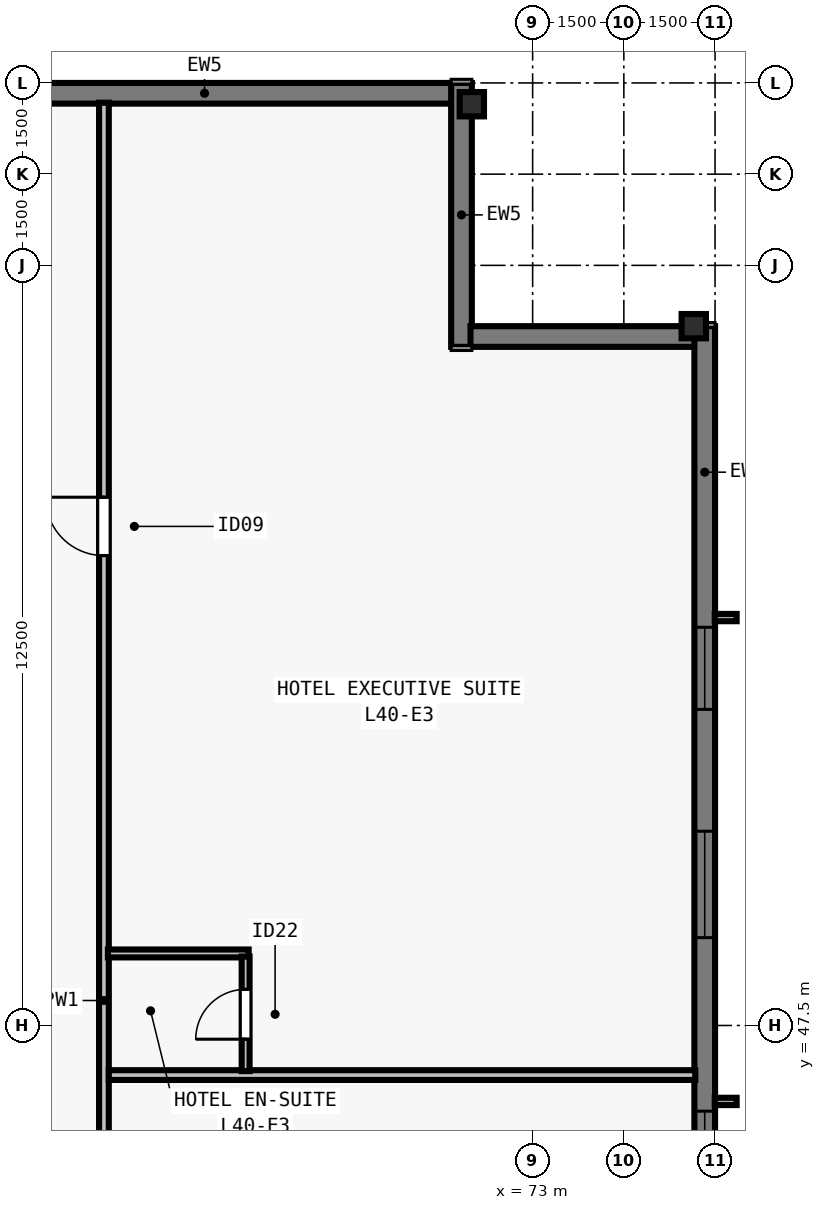
"""IFC4 building model, lengths in metres.
Left out: names, types, materials, properties, quantities, classifications, styles, units other than length and angle.
Written with IfcOpenShell. Run it as: python <this file> out.ifc"""

import sys

from ifc_helpers import new_model, si_unit, direction, frame, frame_2d, origin, origin_2d, place, context, subcontext, project, spatial, rectangle, i_section, extrude, element, fill, save


model = new_model("IFC4")
c1 = context("Model", 3, precision=1e-05, world=origin(), true_north=direction((0.0, 1.0)))
c2 = subcontext(c1, "Body", "Model", "MODEL_VIEW")
j1 = project(units=[si_unit("LENGTHUNIT", "METRE"), si_unit("PLANEANGLEUNIT", "RADIAN")], contexts=[c1])
p1 = place(None, origin())
s1 = spatial("IfcSite", under=j1, at=p1, CompositionType="ELEMENT")
p2 = place(p1, origin())
s2 = spatial("IfcBuilding", under=s1, at=p2, CompositionType="ELEMENT")
p3 = place(p2, frame((0.0, 0.0, 148.0)))
s3 = spatial("IfcBuildingStorey", under=s2, at=p3, CompositionType="ELEMENT", Elevation=148.0)
for number, where, z_axis, x_axis in (
    (1, (75.65, 59.0, 0.0), (0.0, 0.0, 1.0), (0.0, 1.0, 0.0)),
    (2, (72.0, 62.65, 0.0), (0.0, 0.0, 1.0), (1.0, 0.0, 0.0)),
):
    element("IfcColumn", number, at=place(p3, frame(where, z_axis=z_axis, x_axis=x_axis)), inside=s3, PredefinedType="COLUMN", context=c2, shape_type="SweptSolid", body=[
        extrude(i_section(OverallWidth=0.4, OverallDepth=0.4, WebThickness=0.022, FlangeThickness=0.036, at=origin_2d()), origin(), (0.0, 0.0, 1.0), 3.5),
    ])
p4 = place(p3, frame((32.0, 62.83, 0.0), z_axis=(0.0, 0.0, 1.0), x_axis=(1.0, 0.0, 0.0)))
e3 = element("IfcWall", 3, at=p4, inside=s3, PredefinedType="SOLIDWALL", context=c2, shape_type="SweptSolid", body=[
    extrude(rectangle(XDim=39.682, YDim=0.34, at=frame_2d((19.841, 0.0))), origin(), (0.0, 0.0, 1.0), 3.28),
])
p5 = place(p4, frame((4.952, 0.0, 0.8)))
e4 = element("IfcOpeningElement", 4, at=p5, cuts=e3, PredefinedType="OPENING", context=c2, shape_type="SweptSolid", body=[
    extrude(rectangle(XDim=1.35, YDim=1.66, at=frame_2d((0.675, 0.83))), frame((0.0, 0.18, 0.0), z_axis=(0.0, -1.0, 0.0), x_axis=(1.0, 0.0, 0.0)), (0.0, 0.0, 1.0), 0.36),
])
p6 = place(p4, frame((12.059, 0.0, 0.8)))
e5 = element("IfcOpeningElement", 5, at=p6, cuts=e3, PredefinedType="OPENING", context=c2, shape_type="SweptSolid", body=[
    extrude(rectangle(XDim=1.35, YDim=1.66, at=frame_2d((0.675, 0.83))), frame((0.0, 0.18, 0.0), z_axis=(0.0, -1.0, 0.0), x_axis=(1.0, 0.0, 0.0)), (0.0, 0.0, 1.0), 0.36),
])
p7 = place(p4, frame((16.262, 0.0, 0.8)))
e6 = element("IfcOpeningElement", 6, at=p7, cuts=e3, PredefinedType="OPENING", context=c2, shape_type="SweptSolid", body=[
    extrude(rectangle(XDim=1.75, YDim=1.66, at=frame_2d((0.875, 0.83))), frame((0.0, 0.18, 0.0), z_axis=(0.0, -1.0, 0.0), x_axis=(1.0, 0.0, 0.0)), (0.0, 0.0, 1.0), 0.36),
])
p8 = place(p4, frame((18.316, 0.0, 0.8)))
e7 = element("IfcOpeningElement", 7, at=p8, cuts=e3, PredefinedType="OPENING", context=c2, shape_type="SweptSolid", body=[
    extrude(rectangle(XDim=1.35, YDim=1.66, at=frame_2d((0.675, 0.83))), frame((0.0, 0.18, 0.0), z_axis=(0.0, -1.0, 0.0), x_axis=(1.0, 0.0, 0.0)), (0.0, 0.0, 1.0), 0.36),
])
p9 = place(p4, frame((22.07, 0.0, 0.8)))
e8 = element("IfcOpeningElement", 8, at=p9, cuts=e3, PredefinedType="OPENING", context=c2, shape_type="SweptSolid", body=[
    extrude(rectangle(XDim=1.75, YDim=1.66, at=frame_2d((0.875, 0.83))), frame((0.0, 0.18, 0.0), z_axis=(0.0, -1.0, 0.0), x_axis=(1.0, 0.0, 0.0)), (0.0, 0.0, 1.0), 0.36),
])
p10 = place(p4, frame((26.273, 0.0, 0.8)))
e9 = element("IfcOpeningElement", 9, at=p10, cuts=e3, PredefinedType="OPENING", context=c2, shape_type="SweptSolid", body=[
    extrude(rectangle(XDim=1.35, YDim=1.66, at=frame_2d((0.675, 0.83))), frame((0.0, 0.18, 0.0), z_axis=(0.0, -1.0, 0.0), x_axis=(1.0, 0.0, 0.0)), (0.0, 0.0, 1.0), 0.36),
])
p11 = place(p4, frame((29.627, 0.0, 0.8)))
e10 = element("IfcOpeningElement", 10, at=p11, cuts=e3, PredefinedType="OPENING", context=c2, shape_type="SweptSolid", body=[
    extrude(rectangle(XDim=1.75, YDim=1.66, at=frame_2d((0.875, 0.83))), frame((0.0, 0.18, 0.0), z_axis=(0.0, -1.0, 0.0), x_axis=(1.0, 0.0, 0.0)), (0.0, 0.0, 1.0), 0.36),
])
p12 = place(p3, frame((71.83, 63.0, 0.0), z_axis=(0.0, 0.0, 1.0), x_axis=(0.0, -1.0, 0.0)))
e11 = element("IfcWall", 11, at=p12, inside=s3, PredefinedType="SOLIDWALL", context=c2, shape_type="SweptSolid", body=[
    extrude(rectangle(XDim=4.34, YDim=0.34, at=frame_2d((2.17, 0.0))), origin(), (0.0, 0.0, 1.0), 3.28),
])
p13 = place(p3, frame((71.978, 58.83, 0.0), z_axis=(0.0, 0.0, 1.0), x_axis=(1.0, 0.0, 0.0)))
e12 = element("IfcWall", 12, at=p13, inside=s3, PredefinedType="SOLIDWALL", context=c2, shape_type="SweptSolid", body=[
    extrude(rectangle(XDim=3.704, YDim=0.34, at=frame_2d((1.852, 0.0))), origin(), (0.0, 0.0, 1.0), 3.28),
])
p14 = place(p3, frame((75.83, 59.0, 0.0), z_axis=(0.0, 0.0, 1.0), x_axis=(0.0, -1.0, 0.0)))
e13 = element("IfcWall", 13, at=p14, inside=s3, PredefinedType="SOLIDWALL", context=c2, shape_type="SweptSolid", body=[
    extrude(rectangle(XDim=39.682, YDim=0.34, at=frame_2d((19.841, 0.0))), origin(), (0.0, 0.0, 1.0), 3.28),
])
p15 = place(p14, frame((4.952, 0.0, 0.8)))
e14 = element("IfcOpeningElement", 14, at=p15, cuts=e13, PredefinedType="OPENING", context=c2, shape_type="SweptSolid", body=[
    extrude(rectangle(XDim=1.35, YDim=1.66, at=frame_2d((0.675, 0.83))), frame((0.0, 0.18, 0.0), z_axis=(0.0, -1.0, 0.0), x_axis=(1.0, 0.0, 0.0)), (0.0, 0.0, 1.0), 0.36),
])
p16 = place(p14, frame((8.305, 0.0, 0.8)))
e15 = element("IfcOpeningElement", 15, at=p16, cuts=e13, PredefinedType="OPENING", context=c2, shape_type="SweptSolid", body=[
    extrude(rectangle(XDim=1.75, YDim=1.66, at=frame_2d((0.875, 0.83))), frame((0.0, 0.18, 0.0), z_axis=(0.0, -1.0, 0.0), x_axis=(1.0, 0.0, 0.0)), (0.0, 0.0, 1.0), 0.36),
])
p17 = place(p14, frame((12.909, 0.0, 0.8)))
e16 = element("IfcOpeningElement", 16, at=p17, cuts=e13, PredefinedType="OPENING", context=c2, shape_type="SweptSolid", body=[
    extrude(rectangle(XDim=1.35, YDim=1.66, at=frame_2d((0.675, 0.83))), frame((0.0, 0.18, 0.0), z_axis=(0.0, -1.0, 0.0), x_axis=(1.0, 0.0, 0.0)), (0.0, 0.0, 1.0), 0.36),
])
p18 = place(p14, frame((16.262, 0.0, 0.8)))
e17 = element("IfcOpeningElement", 17, at=p18, cuts=e13, PredefinedType="OPENING", context=c2, shape_type="SweptSolid", body=[
    extrude(rectangle(XDim=1.75, YDim=1.66, at=frame_2d((0.875, 0.83))), frame((0.0, 0.18, 0.0), z_axis=(0.0, -1.0, 0.0), x_axis=(1.0, 0.0, 0.0)), (0.0, 0.0, 1.0), 0.36),
])
p19 = place(p14, frame((19.166, 0.0, 0.8)))
e18 = element("IfcOpeningElement", 18, at=p19, cuts=e13, PredefinedType="OPENING", context=c2, shape_type="SweptSolid", body=[
    extrude(rectangle(XDim=1.35, YDim=1.66, at=frame_2d((0.675, 0.83))), frame((0.0, 0.18, 0.0), z_axis=(0.0, -1.0, 0.0), x_axis=(1.0, 0.0, 0.0)), (0.0, 0.0, 1.0), 0.36),
])
p20 = place(p14, frame((22.07, 0.0, 0.8)))
e19 = element("IfcOpeningElement", 19, at=p20, cuts=e13, PredefinedType="OPENING", context=c2, shape_type="SweptSolid", body=[
    extrude(rectangle(XDim=1.75, YDim=1.66, at=frame_2d((0.875, 0.83))), frame((0.0, 0.18, 0.0), z_axis=(0.0, -1.0, 0.0), x_axis=(1.0, 0.0, 0.0)), (0.0, 0.0, 1.0), 0.36),
])
p21 = place(p14, frame((25.823, 0.0, 0.8)))
e20 = element("IfcOpeningElement", 20, at=p21, cuts=e13, PredefinedType="OPENING", context=c2, shape_type="SweptSolid", body=[
    extrude(rectangle(XDim=1.35, YDim=1.66, at=frame_2d((0.675, 0.83))), frame((0.0, 0.18, 0.0), z_axis=(0.0, -1.0, 0.0), x_axis=(1.0, 0.0, 0.0)), (0.0, 0.0, 1.0), 0.36),
])
p22 = place(p14, frame((29.627, 0.0, 0.8)))
e21 = element("IfcOpeningElement", 21, at=p22, cuts=e13, PredefinedType="OPENING", context=c2, shape_type="SweptSolid", body=[
    extrude(rectangle(XDim=1.75, YDim=1.66, at=frame_2d((0.875, 0.83))), frame((0.0, 0.18, 0.0), z_axis=(0.0, -1.0, 0.0), x_axis=(1.0, 0.0, 0.0)), (0.0, 0.0, 1.0), 0.36),
])
p23 = place(p14, frame((33.38, 0.0, 0.8)))
e22 = element("IfcOpeningElement", 22, at=p23, cuts=e13, PredefinedType="OPENING", context=c2, shape_type="SweptSolid", body=[
    extrude(rectangle(XDim=1.35, YDim=1.66, at=frame_2d((0.675, 0.83))), frame((0.0, 0.18, 0.0), z_axis=(0.0, -1.0, 0.0), x_axis=(1.0, 0.0, 0.0)), (0.0, 0.0, 1.0), 0.36),
])
p24 = place(p3, frame((65.95, 15.325, 0.0), z_axis=(0.0, 0.0, 1.0), x_axis=(0.0, 1.0, 0.0)))
e23 = element("IfcWall", 23, at=p24, inside=s3, PredefinedType="PARTITIONING", context=c2, shape_type="SweptSolid", body=[
    extrude(rectangle(XDim=47.35, YDim=0.16, at=frame_2d((23.675, 0.0))), origin(), (0.0, 0.0, 1.0), 2.555),
])
p25 = place(p24, frame((8.902, 0.0, 0.0)))
e24 = element("IfcOpeningElement", 24, at=p25, cuts=e23, PredefinedType="OPENING", context=c2, shape_type="SweptSolid", body=[
    extrude(rectangle(XDim=0.96, YDim=2.15, at=frame_2d((0.48, 1.075))), frame((0.0, 0.09, 0.0), z_axis=(0.0, -1.0, 0.0), x_axis=(1.0, 0.0, 0.0)), (0.0, 0.0, 1.0), 0.18),
])
p26 = place(p24, frame((24.309, 0.0, 0.0)))
e25 = element("IfcOpeningElement", 25, at=p26, cuts=e23, PredefinedType="OPENING", context=c2, shape_type="SweptSolid", body=[
    extrude(rectangle(XDim=0.96, YDim=2.15, at=frame_2d((0.48, 1.075))), frame((0.0, 0.09, 0.0), z_axis=(0.0, -1.0, 0.0), x_axis=(1.0, 0.0, 0.0)), (0.0, 0.0, 1.0), 0.18),
])
p27 = place(p24, frame((39.902, 0.0, 0.0)))
e26 = element("IfcOpeningElement", 26, at=p27, cuts=e23, PredefinedType="OPENING", context=c2, shape_type="SweptSolid", body=[
    extrude(rectangle(XDim=0.96, YDim=2.15, at=frame_2d((0.48, 1.075))), frame((0.0, 0.09, 0.0), z_axis=(0.0, -1.0, 0.0), x_axis=(1.0, 0.0, 0.0)), (0.0, 0.0, 1.0), 0.18),
])
p28 = place(p3, frame((66.03, 46.685, 0.0), z_axis=(0.0, 0.0, 1.0), x_axis=(1.0, 0.0, 0.0)))
e27 = element("IfcWall", 27, at=p28, inside=s3, PredefinedType="PARTITIONING", context=c2, shape_type="SweptSolid", body=[
    extrude(rectangle(XDim=9.645, YDim=0.16, at=frame_2d((4.823, 0.0))), origin(), (0.0, 0.0, 1.0), 3.28),
])
p29 = place(p3, frame((66.015, 48.685, 0.0), z_axis=(0.0, 0.0, 1.0), x_axis=(1.0, 0.0, 0.0)))
e28 = element("IfcWall", 28, at=p29, inside=s3, PredefinedType="PLUMBINGWALL", context=c2, shape_type="SweptSolid", body=[
    extrude(rectangle(XDim=2.315, YDim=0.13, at=frame_2d((1.158, 0.0))), origin(), (0.0, 0.0, 1.0), 3.28),
])
p30 = place(p3, frame((68.28, 46.75, 0.0), z_axis=(0.0, 0.0, 1.0), x_axis=(0.0, 1.0, 0.0)))
e29 = element("IfcWall", 29, at=p30, inside=s3, PredefinedType="PLUMBINGWALL", context=c2, shape_type="SweptSolid", body=[
    extrude(rectangle(XDim=1.885, YDim=0.13, at=frame_2d((0.942, 0.0))), origin(), (0.0, 0.0, 1.0), 3.28),
])
p31 = place(p30, frame((0.525, 0.0, 0.0)))
e30 = element("IfcOpeningElement", 30, at=p31, cuts=e29, PredefinedType="OPENING", context=c2, shape_type="SweptSolid", body=[
    extrude(rectangle(XDim=0.82, YDim=2.1, at=frame_2d((0.41, 1.05))), frame((0.0, 0.075, 0.0), z_axis=(0.0, -1.0, 0.0), x_axis=(1.0, 0.0, 0.0)), (0.0, 0.0, 1.0), 0.15),
])
p32 = place(p15, origin())
e31 = element("IfcWindow", 31, at=p32, inside=s3, PartitioningType="SINGLE_PANEL", PredefinedType="WINDOW", context=c2, shape_type="SweptSolid", body=[
    extrude(rectangle(XDim=1.35, YDim=1.66, at=frame_2d((0.675, 0.83))), frame((0.0, -0.05, 0.0), z_axis=(0.0, -1.0, 0.0), x_axis=(1.0, 0.0, 0.0)), (0.0, 0.0, 1.0), 0.06),
])
fill(e14, e31)
p33 = place(p16, origin())
e32 = element("IfcWindow", 32, at=p33, inside=s3, PartitioningType="SINGLE_PANEL", PredefinedType="WINDOW", context=c2, shape_type="SweptSolid", body=[
    extrude(rectangle(XDim=1.75, YDim=1.66, at=frame_2d((0.875, 0.83))), frame((0.0, -0.05, 0.0), z_axis=(0.0, -1.0, 0.0), x_axis=(1.0, 0.0, 0.0)), (0.0, 0.0, 1.0), 0.06),
])
fill(e15, e32)
p34 = place(p17, origin())
e33 = element("IfcWindow", 33, at=p34, inside=s3, PartitioningType="SINGLE_PANEL", PredefinedType="WINDOW", context=c2, shape_type="SweptSolid", body=[
    extrude(rectangle(XDim=1.35, YDim=1.66, at=frame_2d((0.675, 0.83))), frame((0.0, -0.05, 0.0), z_axis=(0.0, -1.0, 0.0), x_axis=(1.0, 0.0, 0.0)), (0.0, 0.0, 1.0), 0.06),
])
fill(e16, e33)
p35 = place(p31, origin())
e34 = element("IfcDoor", 34, at=p35, inside=s3, OperationType="SINGLE_SWING_LEFT", PredefinedType="DOOR", context=c2, shape_type="SweptSolid", body=[
    extrude(rectangle(XDim=0.82, YDim=2.1, at=frame_2d((0.41, 1.05))), frame((0.0, 0.025, 0.0), z_axis=(0.0, -1.0, 0.0), x_axis=(1.0, 0.0, 0.0)), (0.0, 0.0, 1.0), 0.05),
])
fill(e30, e34)
p36 = place(p27, origin())
e35 = element("IfcDoor", 35, at=p36, inside=s3, OperationType="SINGLE_SWING_RIGHT", PredefinedType="DOOR", context=c2, shape_type="SweptSolid", body=[
    extrude(rectangle(XDim=0.96, YDim=2.15, at=frame_2d((0.48, 1.075))), frame((0.0, 0.025, 0.0), z_axis=(0.0, -1.0, 0.0), x_axis=(1.0, 0.0, 0.0)), (0.0, 0.0, 1.0), 0.05),
])
fill(e26, e35)
save(model, sys.argv[1])
